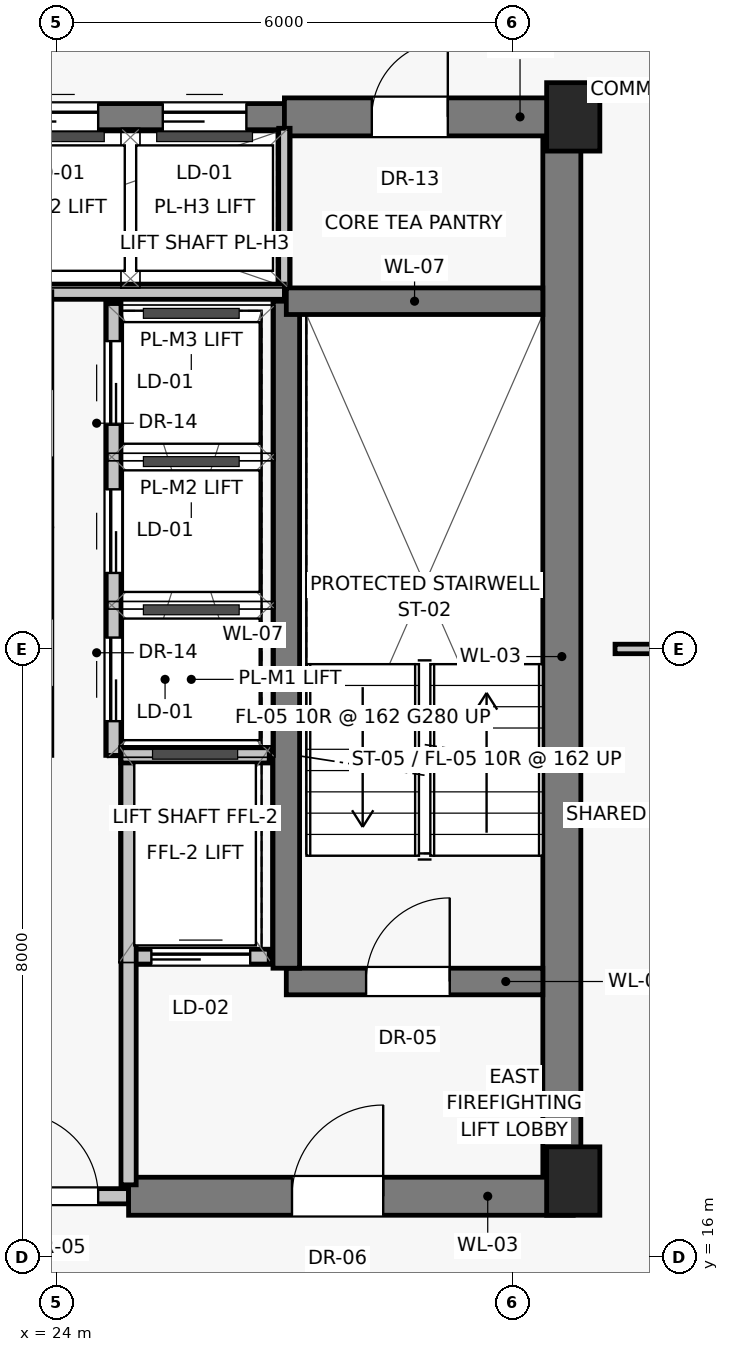
"""IFC4 building model, lengths in metres.
Left out: names, types, materials, properties, quantities, classifications, styles, units other than length and angle.
Written with IfcOpenShell. Run it as: python <this file> out.ifc"""

import sys

from ifc_helpers import new_model, si_unit, direction, frame, frame_2d, origin, origin_2d, place, context, subcontext, project, spatial, rectangle, extrude, source, transform, mapped, element, fill, save


model = new_model("IFC4")
c1 = context("Model", 3, precision=1e-05, world=origin(), true_north=direction((0.0, 1.0)))
c2 = subcontext(c1, "Body", "Model", "MODEL_VIEW")
j1 = project(units=[si_unit("LENGTHUNIT", "METRE"), si_unit("PLANEANGLEUNIT", "RADIAN")], contexts=[c1])
p1 = place(None, origin())
s1 = spatial("IfcSite", under=j1, at=p1, CompositionType="ELEMENT")
p2 = place(p1, origin())
s2 = spatial("IfcBuilding", under=s1, at=p2, CompositionType="ELEMENT")
p3 = place(p2, frame((0.0, 0.0, 178.85)))
s3 = spatial("IfcBuildingStorey", under=s2, at=p3, CompositionType="ELEMENT", Elevation=178.85)
for number, where, z_axis, x_axis in (
    (1, (30.8, 17.0, 0.0), (0.0, 0.0, 1.0), (1.0, 0.0, 0.0)),
    (2, (30.8, 31.0, 0.0), (0.0, 0.0, 1.0), (1.0, 0.0, 0.0)),
):
    element("IfcColumn", number, at=place(p3, frame(where, z_axis=z_axis, x_axis=x_axis)), inside=s3, PredefinedType="PILASTER", context=c2, shape_type="SweptSolid", body=[
        extrude(rectangle(XDim=0.7, YDim=0.9, at=origin_2d()), origin(), (0.0, 0.0, 1.0), 3.25),
    ])
p4 = place(p3, frame((30.65, 16.8, 0.0), z_axis=(0.0, 0.0, 1.0), x_axis=(0.0, 1.0, 0.0)))
e3 = element("IfcWall", 3, at=p4, inside=s3, PredefinedType="SHEAR", context=c2, shape_type="SweptSolid", body=[
    extrude(rectangle(XDim=14.2, YDim=0.5, at=frame_2d((7.1, 0.0))), origin(), (0.0, 0.0, 1.0), 3.015),
])
p5 = place(p3, frame((23.05, 16.8, 0.0), z_axis=(0.0, 0.0, 1.0), x_axis=(1.0, 0.0, 0.0)))
e4 = element("IfcWall", 4, at=p5, inside=s3, PredefinedType="SOLIDWALL", context=c2, shape_type="SweptSolid", body=[
    extrude(rectangle(XDim=1.9, YDim=0.2, at=frame_2d((0.95, 0.0))), origin(), (0.0, 0.0, 1.0), 2.165),
])
p6 = place(p5, frame((0.4, 0.0, 0.0)))
e5 = element("IfcOpeningElement", 5, at=p6, cuts=e4, PredefinedType="OPENING", context=c2, shape_type="SweptSolid", body=[
    extrude(rectangle(XDim=1.1, YDim=2.03, at=frame_2d((0.55, 1.015))), frame((0.0, 0.11, 0.0), z_axis=(0.0, -1.0, 0.0), x_axis=(1.0, 0.0, 0.0)), (0.0, 0.0, 1.0), 0.22),
])
p7 = place(p3, frame((24.95, 16.8, 0.0), z_axis=(0.0, 0.0, 1.0), x_axis=(1.0, 0.0, 0.0)))
e6 = element("IfcWall", 6, at=p7, inside=s3, PredefinedType="SHEAR", context=c2, shape_type="SweptSolid", body=[
    extrude(rectangle(XDim=5.85, YDim=0.5, at=frame_2d((2.925, 0.0))), origin(), (0.0, 0.0, 1.0), 3.015),
])
p8 = place(p7, frame((2.15, 0.0, 0.0)))
e7 = element("IfcOpeningElement", 7, at=p8, cuts=e6, PredefinedType="OPENING", context=c2, shape_type="SweptSolid", body=[
    extrude(rectangle(XDim=1.2, YDim=2.03, at=frame_2d((0.6, 1.015))), frame((0.0, 0.26, 0.0), z_axis=(0.0, -1.0, 0.0), x_axis=(1.0, 0.0, 0.0)), (0.0, 0.0, 1.0), 0.52),
])
p9 = place(p3, frame((21.0, 31.0, 0.0), z_axis=(0.0, 0.0, 1.0), x_axis=(1.0, 0.0, 0.0)))
e8 = element("IfcWall", 8, at=p9, inside=s3, PredefinedType="SHEAR", context=c2, shape_type="SweptSolid", body=[
    extrude(rectangle(XDim=6.0, YDim=0.35, at=frame_2d((3.0, 0.0))), origin(), (0.0, 0.0, 1.0), 3.015),
])
p10 = place(p9, frame((0.5, 0.0, 0.0)))
e9 = element("IfcOpeningElement", 9, at=p10, cuts=e8, PredefinedType="OPENING", context=c2, shape_type="SweptSolid", body=[
    extrude(rectangle(XDim=1.1, YDim=2.08, at=frame_2d((0.55, 1.04))), frame((0.0, 0.185, 0.0), z_axis=(0.0, -1.0, 0.0), x_axis=(1.0, 0.0, 0.0)), (0.0, 0.0, 1.0), 0.37),
])
p11 = place(p9, frame((2.45, 0.0, 0.0)))
e10 = element("IfcOpeningElement", 10, at=p11, cuts=e8, PredefinedType="OPENING", context=c2, shape_type="SweptSolid", body=[
    extrude(rectangle(XDim=1.1, YDim=2.08, at=frame_2d((0.55, 1.04))), frame((0.0, 0.185, 0.0), z_axis=(0.0, -1.0, 0.0), x_axis=(1.0, 0.0, 0.0)), (0.0, 0.0, 1.0), 0.37),
])
p12 = place(p9, frame((4.4, 0.0, 0.0)))
e11 = element("IfcOpeningElement", 11, at=p12, cuts=e8, PredefinedType="OPENING", context=c2, shape_type="SweptSolid", body=[
    extrude(rectangle(XDim=1.1, YDim=2.08, at=frame_2d((0.55, 1.04))), frame((0.0, 0.185, 0.0), z_axis=(0.0, -1.0, 0.0), x_axis=(1.0, 0.0, 0.0)), (0.0, 0.0, 1.0), 0.37),
])
p13 = place(p3, frame((27.0, 31.0, 0.0), z_axis=(0.0, 0.0, 1.0), x_axis=(1.0, 0.0, 0.0)))
e12 = element("IfcWall", 12, at=p13, inside=s3, PredefinedType="SHEAR", context=c2, shape_type="SweptSolid", body=[
    extrude(rectangle(XDim=3.8, YDim=0.5, at=frame_2d((1.9, 0.0))), origin(), (0.0, 0.0, 1.0), 3.015),
])
p14 = place(p13, frame((1.15, 0.0, 0.0)))
e13 = element("IfcOpeningElement", 13, at=p14, cuts=e12, PredefinedType="OPENING", context=c2, shape_type="SweptSolid", body=[
    extrude(rectangle(XDim=1.0, YDim=2.01, at=frame_2d((0.5, 1.005))), frame((0.0, 0.26, 0.0), z_axis=(0.0, -1.0, 0.0), x_axis=(1.0, 0.0, 0.0)), (0.0, 0.0, 1.0), 0.52),
])
p15 = place(p3, frame((27.0, 28.65, 0.0), z_axis=(0.0, 0.0, 1.0), x_axis=(0.0, 1.0, 0.0)))
e14 = element("IfcWall", 14, at=p15, inside=s3, PredefinedType="PARTITIONING", context=c2, shape_type="SweptSolid", body=[
    extrude(rectangle(XDim=2.2, YDim=0.15, at=frame_2d((1.1, 0.0))), origin(), (0.0, 0.0, 1.0), 3.015),
])
p16 = place(p3, frame((24.95, 19.95, 0.0), z_axis=(0.0, 0.0, 1.0), x_axis=(1.0, 0.0, 0.0)))
e15 = element("IfcWall", 15, at=p16, inside=s3, PredefinedType="SOLIDWALL", context=c2, shape_type="SweptSolid", body=[
    extrude(rectangle(XDim=1.85, YDim=0.2, at=frame_2d((0.925, 0.0))), origin(), (0.0, 0.0, 1.0), 3.015),
])
p17 = place(p16, frame((0.3, 0.0, 0.0)))
e16 = element("IfcOpeningElement", 16, at=p17, cuts=e15, PredefinedType="OPENING", context=c2, shape_type="SweptSolid", body=[
    extrude(rectangle(XDim=1.3, YDim=2.25, at=frame_2d((0.65, 1.125))), frame((0.0, 0.11, 0.0), z_axis=(0.0, -1.0, 0.0), x_axis=(1.0, 0.0, 0.0)), (0.0, 0.0, 1.0), 0.22),
])
p18 = place(p3, frame((27.025, 19.625, 0.0), z_axis=(0.0, 0.0, 1.0), x_axis=(1.0, 0.0, 0.0)))
e17 = element("IfcWall", 17, at=p18, inside=s3, PredefinedType="SHEAR", context=c2, shape_type="SweptSolid", body=[
    extrude(rectangle(XDim=3.375, YDim=0.35, at=frame_2d((1.688, 0.0))), origin(), (0.0, 0.0, 1.0), 3.015),
])
p19 = place(p18, frame((1.05, 0.0, 0.0)))
e18 = element("IfcOpeningElement", 18, at=p19, cuts=e17, PredefinedType="OPENING", context=c2, shape_type="SweptSolid", body=[
    extrude(rectangle(XDim=1.1, YDim=2.03, at=frame_2d((0.55, 1.015))), frame((0.0, 0.185, 0.0), z_axis=(0.0, -1.0, 0.0), x_axis=(1.0, 0.0, 0.0)), (0.0, 0.0, 1.0), 0.37),
])
p20 = place(p3, frame((27.025, 19.8, 0.0), z_axis=(0.0, 0.0, 1.0), x_axis=(0.0, 1.0, 0.0)))
e19 = element("IfcWall", 19, at=p20, inside=s3, PredefinedType="SHEAR", context=c2, shape_type="SweptSolid", body=[
    extrude(rectangle(XDim=8.775, YDim=0.35, at=frame_2d((4.387, 0.0))), origin(), (0.0, 0.0, 1.0), 3.015),
])
p21 = place(p3, frame((27.025, 28.575, 0.0), z_axis=(0.0, 0.0, 1.0), x_axis=(1.0, 0.0, 0.0)))
e20 = element("IfcWall", 20, at=p21, inside=s3, PredefinedType="SHEAR", context=c2, shape_type="SweptSolid", body=[
    extrude(rectangle(XDim=3.375, YDim=0.35, at=frame_2d((1.688, 0.0))), origin(), (0.0, 0.0, 1.0), 3.015),
])
p22 = place(p3, frame((24.95, 16.95, 0.0), z_axis=(0.0, 0.0, 1.0), x_axis=(0.0, 1.0, 0.0)))
e21 = element("IfcWall", 21, at=p22, inside=s3, PredefinedType="SOLIDWALL", context=c2, shape_type="SweptSolid", body=[
    extrude(rectangle(XDim=5.6, YDim=0.2, at=frame_2d((2.8, 0.0))), origin(), (0.0, 0.0, 1.0), 3.015),
])
p23 = place(p3, frame((24.85, 22.6, 0.0), z_axis=(0.0, 0.0, 1.0), x_axis=(1.0, 0.0, 0.0)))
e22 = element("IfcWall", 22, at=p23, inside=s3, PredefinedType="SOLIDWALL", context=c2, shape_type="SweptSolid", body=[
    extrude(rectangle(XDim=1.95, YDim=0.2, at=frame_2d((0.975, 0.0))), origin(), (0.0, 0.0, 1.0), 3.015),
])
p24 = place(p3, frame((21.0, 28.7, 0.0), z_axis=(0.0, 0.0, 1.0), x_axis=(1.0, 0.0, 0.0)))
e23 = element("IfcWall", 23, at=p24, inside=s3, PredefinedType="SOLIDWALL", context=c2, shape_type="SweptSolid", body=[
    extrude(rectangle(XDim=6.0, YDim=0.2, at=frame_2d((3.0, 0.0))), origin(), (0.0, 0.0, 1.0), 3.015),
])
p25 = place(p3, frame((24.75, 22.6, 0.0), z_axis=(0.0, 0.0, 1.0), x_axis=(0.0, 1.0, 0.0)))
e24 = element("IfcWall", 24, at=p25, inside=s3, PredefinedType="SOLIDWALL", context=c2, shape_type="SweptSolid", body=[
    extrude(rectangle(XDim=5.95, YDim=0.2, at=frame_2d((2.975, 0.0))), origin(), (0.0, 0.0, 1.0), 3.015),
])
p26 = place(p25, frame((0.45, 0.0, 0.0)))
e25 = element("IfcOpeningElement", 25, at=p26, cuts=e24, PredefinedType="OPENING", context=c2, shape_type="SweptSolid", body=[
    extrude(rectangle(XDim=1.1, YDim=2.08, at=frame_2d((0.55, 1.04))), frame((0.0, 0.11, 0.0), z_axis=(0.0, -1.0, 0.0), x_axis=(1.0, 0.0, 0.0)), (0.0, 0.0, 1.0), 0.22),
])
p27 = place(p25, frame((2.4, 0.0, 0.0)))
e26 = element("IfcOpeningElement", 26, at=p27, cuts=e24, PredefinedType="OPENING", context=c2, shape_type="SweptSolid", body=[
    extrude(rectangle(XDim=1.1, YDim=2.08, at=frame_2d((0.55, 1.04))), frame((0.0, 0.11, 0.0), z_axis=(0.0, -1.0, 0.0), x_axis=(1.0, 0.0, 0.0)), (0.0, 0.0, 1.0), 0.22),
])
p28 = place(p25, frame((4.35, 0.0, 0.0)))
e27 = element("IfcOpeningElement", 27, at=p28, cuts=e24, PredefinedType="OPENING", context=c2, shape_type="SweptSolid", body=[
    extrude(rectangle(XDim=1.1, YDim=2.08, at=frame_2d((0.55, 1.04))), frame((0.0, 0.11, 0.0), z_axis=(0.0, -1.0, 0.0), x_axis=(1.0, 0.0, 0.0)), (0.0, 0.0, 1.0), 0.22),
])
p29 = place(p3, frame((31.35, 24.0, 0.0), z_axis=(0.0, 0.0, 1.0), x_axis=(1.0, 0.0, 0.0)))
e28 = element("IfcWall", 28, at=p29, inside=s3, PredefinedType="PARTITIONING", context=c2, shape_type="SweptSolid", body=[
    extrude(rectangle(XDim=2.1, YDim=0.125, at=frame_2d((1.05, 0.0))), origin(), (0.0, 0.0, 1.0), 3.015),
])
m1 = source(origin(), c2, "Body", "SweptSolid", [
    extrude(rectangle(XDim=1.1, YDim=2.03, at=frame_2d((0.55, 1.015))), frame((0.0, 0.025, 0.0), z_axis=(0.0, -1.0, 0.0), x_axis=(1.0, 0.0, 0.0)), (0.0, 0.0, 1.0), 0.05),
])
p30 = place(p6, origin())
e29 = element("IfcDoor", 29, at=p30, inside=s3, OperationType="SINGLE_SWING_LEFT", PredefinedType="DOOR", context=c2, shape_type="MappedRepresentation", body=[
    mapped(m1, transform((0.0, 0.0, 0.0), scale=1.0)),
])
fill(e5, e29)
m2 = source(origin(), c2, "Body", "SweptSolid", [
    extrude(rectangle(XDim=1.2, YDim=2.03, at=frame_2d((0.6, 1.015))), frame((0.0, 0.025, 0.0), z_axis=(0.0, -1.0, 0.0), x_axis=(1.0, 0.0, 0.0)), (0.0, 0.0, 1.0), 0.05),
])
p31 = place(p8, origin())
e30 = element("IfcDoor", 30, at=p31, inside=s3, OperationType="SINGLE_SWING_RIGHT", PredefinedType="DOOR", context=c2, shape_type="MappedRepresentation", body=[
    mapped(m2, transform((0.0, 0.0, 0.0), scale=1.0)),
])
fill(e7, e30)
m3 = source(origin(), c2, "Body", "SweptSolid", [
    extrude(rectangle(XDim=1.1, YDim=2.08, at=frame_2d((0.55, 1.04))), frame((0.0, 0.025, 0.0), z_axis=(0.0, -1.0, 0.0), x_axis=(1.0, 0.0, 0.0)), (0.0, 0.0, 1.0), 0.05),
])
p32 = place(p11, origin())
e31 = element("IfcDoor", 31, at=p32, inside=s3, OperationType="SLIDING_TO_LEFT", PredefinedType="DOOR", context=c2, shape_type="MappedRepresentation", body=[
    mapped(m3, transform((0.0, 0.0, 0.0), scale=1.0)),
])
fill(e10, e31)
p33 = place(p12, origin())
e32 = element("IfcDoor", 32, at=p33, inside=s3, OperationType="SLIDING_TO_LEFT", PredefinedType="DOOR", context=c2, shape_type="MappedRepresentation", body=[
    mapped(m3, transform((0.0, 0.0, 0.0), scale=1.0)),
])
fill(e11, e32)
m4 = source(origin(), c2, "Body", "SweptSolid", [
    extrude(rectangle(XDim=1.0, YDim=2.01, at=frame_2d((0.5, 1.005))), frame((0.0, 0.025, 0.0), z_axis=(0.0, -1.0, 0.0), x_axis=(1.0, 0.0, 0.0)), (0.0, 0.0, 1.0), 0.05),
])
p34 = place(p14, origin())
e33 = element("IfcDoor", 33, at=p34, inside=s3, OperationType="SINGLE_SWING_RIGHT", PredefinedType="DOOR", context=c2, shape_type="MappedRepresentation", body=[
    mapped(m4, transform((0.0, 0.0, 0.0), scale=1.0)),
])
fill(e13, e33)
m5 = source(origin(), c2, "Body", "SweptSolid", [
    extrude(rectangle(XDim=1.3, YDim=2.25, at=frame_2d((0.65, 1.125))), frame((0.0, 0.025, 0.0), z_axis=(0.0, -1.0, 0.0), x_axis=(1.0, 0.0, 0.0)), (0.0, 0.0, 1.0), 0.05),
])
p35 = place(p17, origin())
e34 = element("IfcDoor", 34, at=p35, inside=s3, OperationType="SLIDING_TO_LEFT", PredefinedType="DOOR", context=c2, shape_type="MappedRepresentation", body=[
    mapped(m5, transform((0.0, 0.0, 0.0), scale=1.0)),
])
fill(e16, e34)
p36 = place(p19, origin())
e35 = element("IfcDoor", 35, at=p36, inside=s3, OperationType="SINGLE_SWING_RIGHT", PredefinedType="DOOR", context=c2, shape_type="MappedRepresentation", body=[
    mapped(m1, transform((0.0, 0.0, 0.0), scale=1.0)),
])
fill(e18, e35)
p37 = place(p26, origin())
e36 = element("IfcDoor", 36, at=p37, inside=s3, OperationType="SLIDING_TO_LEFT", PredefinedType="DOOR", context=c2, shape_type="MappedRepresentation", body=[
    mapped(m3, transform((0.0, 0.0, 0.0), scale=1.0)),
])
fill(e25, e36)
p38 = place(p27, origin())
e37 = element("IfcDoor", 37, at=p38, inside=s3, OperationType="SLIDING_TO_LEFT", PredefinedType="DOOR", context=c2, shape_type="MappedRepresentation", body=[
    mapped(m3, transform((0.0, 0.0, 0.0), scale=1.0)),
])
fill(e26, e37)
p39 = place(p28, origin())
e38 = element("IfcDoor", 38, at=p39, inside=s3, OperationType="SLIDING_TO_LEFT", PredefinedType="DOOR", context=c2, shape_type="MappedRepresentation", body=[
    mapped(m3, transform((0.0, 0.0, 0.0), scale=1.0)),
])
fill(e27, e38)
save(model, sys.argv[1])
